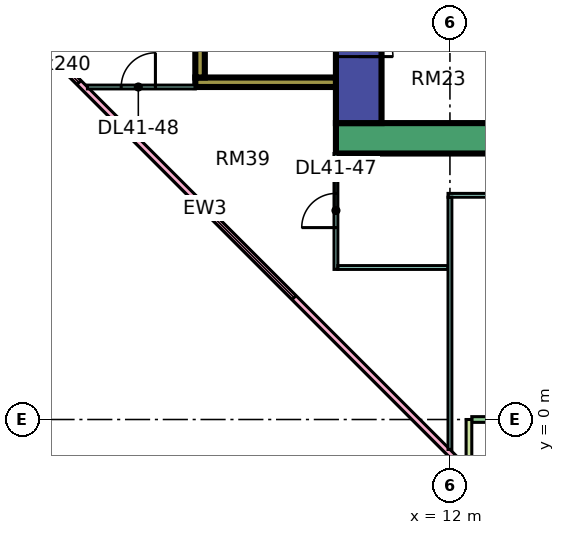
"""IFC4 building model, lengths in metres.
Left out: names, types, materials, properties, quantities, classifications, styles, units other than length and angle.
Written with IfcOpenShell. Run it as: python <this file> out.ifc"""

import sys

from ifc_helpers import new_model, si_unit, direction, frame, frame_2d, origin, place, context, subcontext, project, spatial, rectangle, extrude, element, fill, save


model = new_model("IFC4")
c1 = context("Model", 3, precision=1e-05, world=origin(), true_north=direction((0.0, 1.0)))
c2 = subcontext(c1, "Body", "Model", "MODEL_VIEW")
j1 = project(units=[si_unit("LENGTHUNIT", "METRE"), si_unit("PLANEANGLEUNIT", "RADIAN")], contexts=[c1])
p1 = place(None, origin())
s1 = spatial("IfcSite", under=j1, at=p1, CompositionType="ELEMENT")
p2 = place(p1, origin())
s2 = spatial("IfcBuilding", under=s1, at=p2, CompositionType="ELEMENT")
p3 = place(p2, frame((0.0, 0.0, 179.9)))
s3 = spatial("IfcBuildingStorey", under=s2, at=p3, CompositionType="ELEMENT", Elevation=179.9)
p4 = place(p3, frame((9.0, 7.4, 0.0), z_axis=(0.0, 0.0, 1.0), x_axis=(1.0, 0.0, 0.0)))
e1 = element("IfcWall", 1, at=p4, inside=s3, PredefinedType="SHEAR", context=c2, shape_type="SweptSolid", body=[
    extrude(rectangle(XDim=25.0, YDim=0.8, at=frame_2d((12.5, 0.0))), origin(), (0.0, 0.0, 1.0), 3.75),
])
p5 = place(p3, frame((9.6, 7.8, 0.0), z_axis=(0.0, 0.0, 1.0), x_axis=(0.0, 1.0, 0.0)))
e2 = element("IfcWall", 2, at=p5, inside=s3, PredefinedType="SHEAR", context=c2, shape_type="SweptSolid", body=[
    extrude(rectangle(XDim=11.4, YDim=1.2, at=frame_2d((5.7, 0.0))), origin(), (0.0, 0.0, 1.0), 3.75),
])
p6 = place(p5, frame((4.075, 0.0, 0.0)))
e3 = element("IfcOpeningElement", 3, at=p6, cuts=e2, PredefinedType="OPENING", context=c2, shape_type="SweptSolid", body=[
    extrude(rectangle(XDim=1.1, YDim=2.2, at=frame_2d((0.55, 1.1))), frame((0.0, 0.61, 0.0), z_axis=(0.0, -1.0, 0.0), x_axis=(1.0, 0.0, 0.0)), (0.0, 0.0, 1.0), 1.22),
])
p7 = place(p5, frame((6.575, 0.0, 0.0)))
e4 = element("IfcOpeningElement", 4, at=p7, cuts=e2, PredefinedType="OPENING", context=c2, shape_type="SweptSolid", body=[
    extrude(rectangle(XDim=1.1, YDim=2.2, at=frame_2d((0.55, 1.1))), frame((0.0, 0.61, 0.0), z_axis=(0.0, -1.0, 0.0), x_axis=(1.0, 0.0, 0.0)), (0.0, 0.0, 1.0), 1.22),
])
p8 = place(p5, frame((9.4, 0.0, 0.0)))
e5 = element("IfcOpeningElement", 5, at=p8, cuts=e2, PredefinedType="OPENING", context=c2, shape_type="SweptSolid", body=[
    extrude(rectangle(XDim=1.1, YDim=2.2, at=frame_2d((0.55, 1.1))), frame((0.0, 0.61, 0.0), z_axis=(0.0, -1.0, 0.0), x_axis=(1.0, 0.0, 0.0)), (0.0, 0.0, 1.0), 1.22),
])
p9 = place(p5, frame((1.75, 0.0, 0.0)))
e6 = element("IfcOpeningElement", 6, at=p9, cuts=e2, PredefinedType="OPENING", context=c2, shape_type="SweptSolid", body=[
    extrude(rectangle(XDim=0.9, YDim=2.1, at=frame_2d((0.45, 1.05))), frame((0.0, 0.61, 0.0), z_axis=(0.0, -1.0, 0.0), x_axis=(1.0, 0.0, 0.0)), (0.0, 0.0, 1.0), 1.22),
])
p10 = place(p3, frame((5.3, 8.875, 0.0), z_axis=(0.0, 0.0, 1.0), x_axis=(1.0, 0.0, 0.0)))
e7 = element("IfcWall", 7, at=p10, inside=s3, PredefinedType="SHEAR", context=c2, shape_type="SweptSolid", body=[
    extrude(rectangle(XDim=3.7, YDim=0.25, at=frame_2d((1.85, 0.0))), origin(), (0.0, 0.0, 1.0), 3.75),
])
p11 = place(p3, frame((5.425, 9.0, 0.0), z_axis=(0.0, 0.0, 1.0), x_axis=(0.0, 1.0, 0.0)))
e8 = element("IfcWall", 8, at=p11, inside=s3, PredefinedType="SHEAR", context=c2, shape_type="SweptSolid", body=[
    extrude(rectangle(XDim=4.0, YDim=0.25, at=frame_2d((2.0, 0.0))), origin(), (0.0, 0.0, 1.0), 3.75),
])
p12 = place(p3, frame((-1.447, 12.553, 0.0), z_axis=(0.0, 0.0, 1.0), x_axis=(0.707106781187, -0.707106781187, 0.0)))
e9 = element("IfcWall", 9, at=p12, inside=s3, PredefinedType="SOLIDWALL", context=c2, shape_type="SweptSolid", body=[
    extrude(rectangle(XDim=19.799, YDim=0.15, at=frame_2d((9.899, 0.0))), origin(), (0.0, 0.0, 1.0), 3.35),
])
p13 = place(p12, frame((2.212, 0.0, 0.45)))
e10 = element("IfcOpeningElement", 10, at=p13, cuts=e9, PredefinedType="OPENING", context=c2, shape_type="SweptSolid", body=[
    extrude(rectangle(XDim=3.0, YDim=2.4, at=frame_2d((1.5, 1.2))), frame((0.0, 0.085, 0.0), z_axis=(0.0, -1.0, 0.0), x_axis=(1.0, 0.0, 0.0)), (0.0, 0.0, 1.0), 0.17),
])
p14 = place(p12, frame((10.216, 0.0, 0.45)))
e11 = element("IfcOpeningElement", 11, at=p14, cuts=e9, PredefinedType="OPENING", context=c2, shape_type="SweptSolid", body=[
    extrude(rectangle(XDim=3.0, YDim=2.4, at=frame_2d((1.5, 1.2))), frame((0.0, 0.085, 0.0), z_axis=(0.0, -1.0, 0.0), x_axis=(1.0, 0.0, 0.0)), (0.0, 0.0, 1.0), 0.17),
])
p15 = place(p3, frame((12.575, 0.0, 0.0), z_axis=(0.0, 0.0, 1.0), x_axis=(1.0, 0.0, 0.0)))
e12 = element("IfcWall", 12, at=p15, inside=s3, PredefinedType="SOLIDWALL", context=c2, shape_type="SweptSolid", body=[
    extrude(rectangle(XDim=11.35, YDim=0.15, at=frame_2d((5.675, 0.0))), origin(), (0.0, 0.0, 1.0), 3.35),
])
p16 = place(p15, frame((3.312, 0.0, 0.0)))
e13 = element("IfcOpeningElement", 13, at=p16, cuts=e12, PredefinedType="OPENING", context=c2, shape_type="SweptSolid", body=[
    extrude(rectangle(XDim=1.8, YDim=2.4, at=frame_2d((0.9, 1.2))), frame((0.0, 0.085, 0.0), z_axis=(0.0, -1.0, 0.0), x_axis=(1.0, 0.0, 0.0)), (0.0, 0.0, 1.0), 0.17),
])
p17 = place(p15, frame((9.05, 0.0, 0.45)))
e14 = element("IfcOpeningElement", 14, at=p17, cuts=e12, PredefinedType="OPENING", context=c2, shape_type="SweptSolid", body=[
    extrude(rectangle(XDim=1.2, YDim=2.4, at=frame_2d((0.6, 1.2))), frame((0.0, 0.085, 0.0), z_axis=(0.0, -1.0, 0.0), x_axis=(1.0, 0.0, 0.0)), (0.0, 0.0, 1.0), 0.17),
])
p18 = place(p3, frame((12.5, -1.5, 0.0), z_axis=(0.0, 0.0, 1.0), x_axis=(0.0, 1.0, 0.0)))
e15 = element("IfcWall", 15, at=p18, inside=s3, PredefinedType="SOLIDWALL", context=c2, shape_type="SweptSolid", body=[
    extrude(rectangle(XDim=1.5, YDim=0.15, at=frame_2d((0.75, 0.0))), origin(), (0.0, 0.0, 1.0), 3.35),
])
p19 = place(p3, frame((2.461, 8.75, 0.0), z_axis=(0.0, 0.0, 1.0), x_axis=(1.0, 0.0, 0.0)))
e16 = element("IfcWall", 16, at=p19, inside=s3, PredefinedType="PARTITIONING", context=c2, shape_type="SweptSolid", body=[
    extrude(rectangle(XDim=2.839, YDim=0.1, at=frame_2d((1.419, 0.0))), origin(), (0.0, 0.0, 1.0), 3.35),
])
p20 = place(p19, frame((0.889, 0.0, 0.0)))
e17 = element("IfcOpeningElement", 17, at=p20, cuts=e16, PredefinedType="OPENING", context=c2, shape_type="SweptSolid", body=[
    extrude(rectangle(XDim=0.9, YDim=2.1, at=frame_2d((0.45, 1.05))), frame((0.0, 0.06, 0.0), z_axis=(0.0, -1.0, 0.0), x_axis=(1.0, 0.0, 0.0)), (0.0, 0.0, 1.0), 0.12),
])
p21 = place(p3, frame((9.0, 3.95, 0.0), z_axis=(0.0, 0.0, 1.0), x_axis=(0.0, 1.0, 0.0)))
e18 = element("IfcWall", 18, at=p21, inside=s3, PredefinedType="PARTITIONING", context=c2, shape_type="SweptSolid", body=[
    extrude(rectangle(XDim=3.05, YDim=0.1, at=frame_2d((1.525, 0.0))), origin(), (0.0, 0.0, 1.0), 3.35),
])
p22 = place(p21, frame((1.1, 0.0, 0.0)))
e19 = element("IfcOpeningElement", 19, at=p22, cuts=e18, PredefinedType="OPENING", context=c2, shape_type="SweptSolid", body=[
    extrude(rectangle(XDim=0.9, YDim=2.1, at=frame_2d((0.45, 1.05))), frame((0.0, 0.06, 0.0), z_axis=(0.0, -1.0, 0.0), x_axis=(1.0, 0.0, 0.0)), (0.0, 0.0, 1.0), 0.12),
])
p23 = place(p3, frame((9.05, 4.0, 0.0), z_axis=(0.0, 0.0, 1.0), x_axis=(1.0, 0.0, 0.0)))
e20 = element("IfcWall", 20, at=p23, inside=s3, PredefinedType="PARTITIONING", context=c2, shape_type="SweptSolid", body=[
    extrude(rectangle(XDim=2.9, YDim=0.1, at=frame_2d((1.45, 0.0))), origin(), (0.0, 0.0, 1.0), 3.35),
])
p24 = place(p3, frame((11.95, 5.9, 0.0), z_axis=(0.0, 0.0, 1.0), x_axis=(1.0, 0.0, 0.0)))
e21 = element("IfcWall", 21, at=p24, inside=s3, PredefinedType="PARTITIONING", context=c2, shape_type="SweptSolid", body=[
    extrude(rectangle(XDim=21.1, YDim=0.1, at=frame_2d((10.55, 0.0))), origin(), (0.0, 0.0, 1.0), 3.35),
])
p25 = place(p24, frame((10.1, 0.0, 0.0)))
e22 = element("IfcOpeningElement", 22, at=p25, cuts=e21, PredefinedType="OPENING", context=c2, shape_type="SweptSolid", body=[
    extrude(rectangle(XDim=0.9, YDim=2.1, at=frame_2d((0.45, 1.05))), frame((0.0, 0.06, 0.0), z_axis=(0.0, -1.0, 0.0), x_axis=(1.0, 0.0, 0.0)), (0.0, 0.0, 1.0), 0.12),
])
p26 = place(p24, frame((13.1, 0.0, 0.0)))
e23 = element("IfcOpeningElement", 23, at=p26, cuts=e21, PredefinedType="OPENING", context=c2, shape_type="SweptSolid", body=[
    extrude(rectangle(XDim=0.9, YDim=2.1, at=frame_2d((0.45, 1.05))), frame((0.0, 0.06, 0.0), z_axis=(0.0, -1.0, 0.0), x_axis=(1.0, 0.0, 0.0)), (0.0, 0.0, 1.0), 0.12),
])
p27 = place(p24, frame((16.1, 0.0, 0.0)))
e24 = element("IfcOpeningElement", 24, at=p27, cuts=e21, PredefinedType="OPENING", context=c2, shape_type="SweptSolid", body=[
    extrude(rectangle(XDim=0.9, YDim=2.1, at=frame_2d((0.45, 1.05))), frame((0.0, 0.06, 0.0), z_axis=(0.0, -1.0, 0.0), x_axis=(1.0, 0.0, 0.0)), (0.0, 0.0, 1.0), 0.12),
])
p28 = place(p24, frame((4.1, 0.0, 0.0)))
e25 = element("IfcOpeningElement", 25, at=p28, cuts=e21, PredefinedType="OPENING", context=c2, shape_type="SweptSolid", body=[
    extrude(rectangle(XDim=0.9, YDim=2.1, at=frame_2d((0.45, 1.05))), frame((0.0, 0.06, 0.0), z_axis=(0.0, -1.0, 0.0), x_axis=(1.0, 0.0, 0.0)), (0.0, 0.0, 1.0), 0.12),
])
p29 = place(p3, frame((12.0, -0.788, 0.0), z_axis=(0.0, 0.0, 1.0), x_axis=(0.0, 1.0, 0.0)))
e26 = element("IfcWall", 26, at=p29, inside=s3, PredefinedType="PARTITIONING", context=c2, shape_type="SweptSolid", body=[
    extrude(rectangle(XDim=6.638, YDim=0.1, at=frame_2d((3.319, 0.0))), origin(), (0.0, 0.0, 1.0), 3.35),
])
p30 = place(p13, origin())
e27 = element("IfcWindow", 27, at=p30, inside=s3, PartitioningType="SINGLE_PANEL", PredefinedType="WINDOW", context=c2, shape_type="SweptSolid", body=[
    extrude(rectangle(XDim=3.0, YDim=2.4, at=frame_2d((1.5, 1.2))), frame((0.0, 0.03, 0.0), z_axis=(0.0, -1.0, 0.0), x_axis=(1.0, 0.0, 0.0)), (0.0, 0.0, 1.0), 0.06),
])
fill(e10, e27)
p31 = place(p14, origin())
e28 = element("IfcWindow", 28, at=p31, inside=s3, PartitioningType="SINGLE_PANEL", PredefinedType="WINDOW", context=c2, shape_type="SweptSolid", body=[
    extrude(rectangle(XDim=3.0, YDim=2.4, at=frame_2d((1.5, 1.2))), frame((0.0, 0.03, 0.0), z_axis=(0.0, -1.0, 0.0), x_axis=(1.0, 0.0, 0.0)), (0.0, 0.0, 1.0), 0.06),
])
fill(e11, e28)
p32 = place(p9, frame((0.9, 0.0, 0.0), z_axis=(0.0, 0.0, 1.0), x_axis=(-1.0, 0.0, 0.0)))
e29 = element("IfcDoor", 29, at=p32, inside=s3, OperationType="SINGLE_SWING_LEFT", PredefinedType="DOOR", context=c2, shape_type="SweptSolid", body=[
    extrude(rectangle(XDim=0.9, YDim=2.1, at=frame_2d((0.45, 1.05))), frame((0.0, 0.025, 0.0), z_axis=(0.0, -1.0, 0.0), x_axis=(1.0, 0.0, 0.0)), (0.0, 0.0, 1.0), 0.05),
])
fill(e6, e29)
p33 = place(p22, origin())
e30 = element("IfcDoor", 30, at=p33, inside=s3, OperationType="SINGLE_SWING_LEFT", PredefinedType="DOOR", context=c2, shape_type="SweptSolid", body=[
    extrude(rectangle(XDim=0.9, YDim=2.1, at=frame_2d((0.45, 1.05))), frame((0.0, 0.025, 0.0), z_axis=(0.0, -1.0, 0.0), x_axis=(1.0, 0.0, 0.0)), (0.0, 0.0, 1.0), 0.05),
])
fill(e19, e30)
p34 = place(p20, frame((0.9, 0.0, 0.0), z_axis=(0.0, 0.0, 1.0), x_axis=(-1.0, 0.0, 0.0)))
e31 = element("IfcDoor", 31, at=p34, inside=s3, OperationType="SINGLE_SWING_RIGHT", PredefinedType="DOOR", context=c2, shape_type="SweptSolid", body=[
    extrude(rectangle(XDim=0.9, YDim=2.1, at=frame_2d((0.45, 1.05))), frame((0.0, 0.025, 0.0), z_axis=(0.0, -1.0, 0.0), x_axis=(1.0, 0.0, 0.0)), (0.0, 0.0, 1.0), 0.05),
])
fill(e17, e31)
save(model, sys.argv[1])
